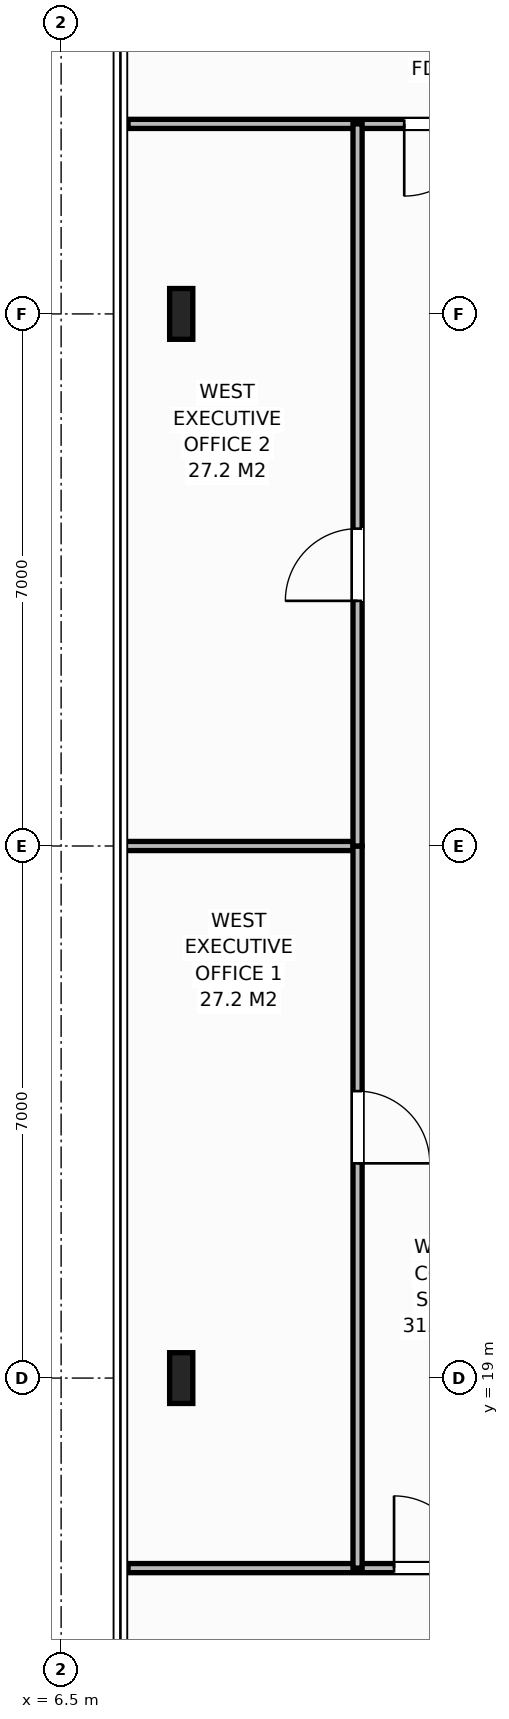
"""IFC4 building model, lengths in metres.
Left out: names, types, materials, properties, quantities, classifications, styles, units other than length and angle.
Written with IfcOpenShell. Run it as: python <this file> out.ifc"""

import sys

from ifc_helpers import new_model, si_unit, direction, frame, frame_2d, origin, origin_2d, place, context, subcontext, project, spatial, rectangle, i_section, extrude, element, fill, save


model = new_model("IFC4")
c1 = context("Model", 3, precision=1e-05, world=origin(), true_north=direction((0.0, 1.0)))
c2 = subcontext(c1, "Body", "Model", "MODEL_VIEW")
j1 = project(units=[si_unit("LENGTHUNIT", "METRE"), si_unit("PLANEANGLEUNIT", "RADIAN")], contexts=[c1])
p1 = place(None, origin())
s1 = spatial("IfcSite", under=j1, at=p1, CompositionType="ELEMENT")
p2 = place(p1, origin())
s2 = spatial("IfcBuilding", under=s1, at=p2, CompositionType="ELEMENT")
p3 = place(p2, frame((0.0, 0.0, 286.4)))
s3 = spatial("IfcBuildingStorey", under=s2, at=p3, CompositionType="ELEMENT", Elevation=286.4)
for number, where, z_axis, x_axis in (
    (1, (8.08, 19.0, 0.0), (0.0, 0.0, 1.0), (1.0, 0.0, 0.0)),
    (2, (8.08, 33.0, 0.0), (0.0, 0.0, 1.0), (1.0, 0.0, 0.0)),
):
    element("IfcColumn", number, at=place(p3, frame(where, z_axis=z_axis, x_axis=x_axis)), inside=s3, PredefinedType="COLUMN", context=c2, shape_type="SweptSolid", body=[
        extrude(i_section(OverallWidth=0.305, OverallDepth=0.668, WebThickness=0.021, FlangeThickness=0.04, at=origin_2d()), origin(), (0.0, 0.0, 1.0), 4.0),
    ])
p4 = place(p3, frame((7.38, 35.5, 0.0), z_axis=(0.0, 0.0, 1.0), x_axis=(1.0, 0.0, 0.0)))
e3 = element("IfcWall", 3, at=p4, inside=s3, PredefinedType="PARTITIONING", context=c2, shape_type="SweptSolid", body=[
    extrude(rectangle(XDim=5.198, YDim=0.12, at=frame_2d((2.599, 0.0))), origin(), (0.0, 0.0, 1.0), 3.788),
])
p5 = place(p4, frame((3.634, 0.0, 0.0)))
e4 = element("IfcOpeningElement", 4, at=p5, cuts=e3, PredefinedType="OPENING", context=c2, shape_type="SweptSolid", body=[
    extrude(rectangle(XDim=0.95, YDim=2.15, at=frame_2d((0.475, 1.075))), frame((0.0, 0.07, 0.0), z_axis=(0.0, -1.0, 0.0), x_axis=(1.0, 0.0, 0.0)), (0.0, 0.0, 1.0), 0.14),
])
p6 = place(p3, frame((7.38, 16.5, 0.0), z_axis=(0.0, 0.0, 1.0), x_axis=(1.0, 0.0, 0.0)))
e5 = element("IfcWall", 5, at=p6, inside=s3, PredefinedType="PARTITIONING", context=c2, shape_type="SweptSolid", body=[
    extrude(rectangle(XDim=7.581, YDim=0.12, at=frame_2d((3.791, 0.0))), origin(), (0.0, 0.0, 1.0), 3.788),
])
p7 = place(p6, frame((3.5, 0.0, 0.0)))
e6 = element("IfcOpeningElement", 6, at=p7, cuts=e5, PredefinedType="OPENING", context=c2, shape_type="SweptSolid", body=[
    extrude(rectangle(XDim=0.95, YDim=2.15, at=frame_2d((0.475, 1.075))), frame((0.0, 0.07, 0.0), z_axis=(0.0, -1.0, 0.0), x_axis=(1.0, 0.0, 0.0)), (0.0, 0.0, 1.0), 0.14),
])
p8 = place(p3, frame((7.22, 26.0, 0.0), z_axis=(0.0, 0.0, 1.0), x_axis=(1.0, 0.0, 0.0)))
e7 = element("IfcWall", 7, at=p8, inside=s3, PredefinedType="PARTITIONING", context=c2, shape_type="SweptSolid", body=[
    extrude(rectangle(XDim=3.18, YDim=0.12, at=frame_2d((1.59, 0.0))), origin(), (0.0, 0.0, 1.0), 3.788),
])
p9 = place(p3, frame((10.4, 16.5, 0.0), z_axis=(0.0, 0.0, 1.0), x_axis=(0.0, 1.0, 0.0)))
e8 = element("IfcWall", 8, at=p9, inside=s3, PredefinedType="PARTITIONING", context=c2, shape_type="SweptSolid", body=[
    extrude(rectangle(XDim=9.5, YDim=0.12, at=frame_2d((4.75, 0.0))), origin(), (0.0, 0.0, 1.0), 3.788),
])
p10 = place(p9, frame((5.325, 0.0, 0.0)))
e9 = element("IfcOpeningElement", 9, at=p10, cuts=e8, PredefinedType="OPENING", context=c2, shape_type="SweptSolid", body=[
    extrude(rectangle(XDim=0.95, YDim=2.15, at=frame_2d((0.475, 1.075))), frame((0.0, 0.07, 0.0), z_axis=(0.0, -1.0, 0.0), x_axis=(1.0, 0.0, 0.0)), (0.0, 0.0, 1.0), 0.14),
])
p11 = place(p3, frame((10.4, 26.0, 0.0), z_axis=(0.0, 0.0, 1.0), x_axis=(0.0, 1.0, 0.0)))
e10 = element("IfcWall", 10, at=p11, inside=s3, PredefinedType="PARTITIONING", context=c2, shape_type="SweptSolid", body=[
    extrude(rectangle(XDim=9.5, YDim=0.12, at=frame_2d((4.75, 0.0))), origin(), (0.0, 0.0, 1.0), 3.788),
])
p12 = place(p11, frame((3.225, 0.0, 0.0)))
e11 = element("IfcOpeningElement", 11, at=p12, cuts=e10, PredefinedType="OPENING", context=c2, shape_type="SweptSolid", body=[
    extrude(rectangle(XDim=0.95, YDim=2.15, at=frame_2d((0.475, 1.075))), frame((0.0, 0.07, 0.0), z_axis=(0.0, -1.0, 0.0), x_axis=(1.0, 0.0, 0.0)), (0.0, 0.0, 1.0), 0.14),
])
p13 = place(p5, origin())
e12 = element("IfcDoor", 12, at=p13, inside=s3, OperationType="SINGLE_SWING_RIGHT", PredefinedType="DOOR", context=c2, shape_type="SweptSolid", body=[
    extrude(rectangle(XDim=0.95, YDim=2.15, at=frame_2d((0.475, 1.075))), frame((0.0, 0.025, 0.0), z_axis=(0.0, -1.0, 0.0), x_axis=(1.0, 0.0, 0.0)), (0.0, 0.0, 1.0), 0.05),
])
fill(e4, e12)
p14 = place(p7, origin())
e13 = element("IfcDoor", 13, at=p14, inside=s3, OperationType="SINGLE_SWING_LEFT", PredefinedType="DOOR", context=c2, shape_type="SweptSolid", body=[
    extrude(rectangle(XDim=0.95, YDim=2.15, at=frame_2d((0.475, 1.075))), frame((0.0, 0.025, 0.0), z_axis=(0.0, -1.0, 0.0), x_axis=(1.0, 0.0, 0.0)), (0.0, 0.0, 1.0), 0.05),
])
fill(e6, e13)
p15 = place(p10, origin())
e14 = element("IfcDoor", 14, at=p15, inside=s3, OperationType="SINGLE_SWING_RIGHT", PredefinedType="DOOR", context=c2, shape_type="SweptSolid", body=[
    extrude(rectangle(XDim=0.95, YDim=2.15, at=frame_2d((0.475, 1.075))), frame((0.0, 0.025, 0.0), z_axis=(0.0, -1.0, 0.0), x_axis=(1.0, 0.0, 0.0)), (0.0, 0.0, 1.0), 0.05),
])
fill(e9, e14)
p16 = place(p12, origin())
e15 = element("IfcDoor", 15, at=p16, inside=s3, OperationType="SINGLE_SWING_LEFT", PredefinedType="DOOR", context=c2, shape_type="SweptSolid", body=[
    extrude(rectangle(XDim=0.95, YDim=2.15, at=frame_2d((0.475, 1.075))), frame((0.0, 0.025, 0.0), z_axis=(0.0, -1.0, 0.0), x_axis=(1.0, 0.0, 0.0)), (0.0, 0.0, 1.0), 0.05),
])
fill(e11, e15)
save(model, sys.argv[1])
